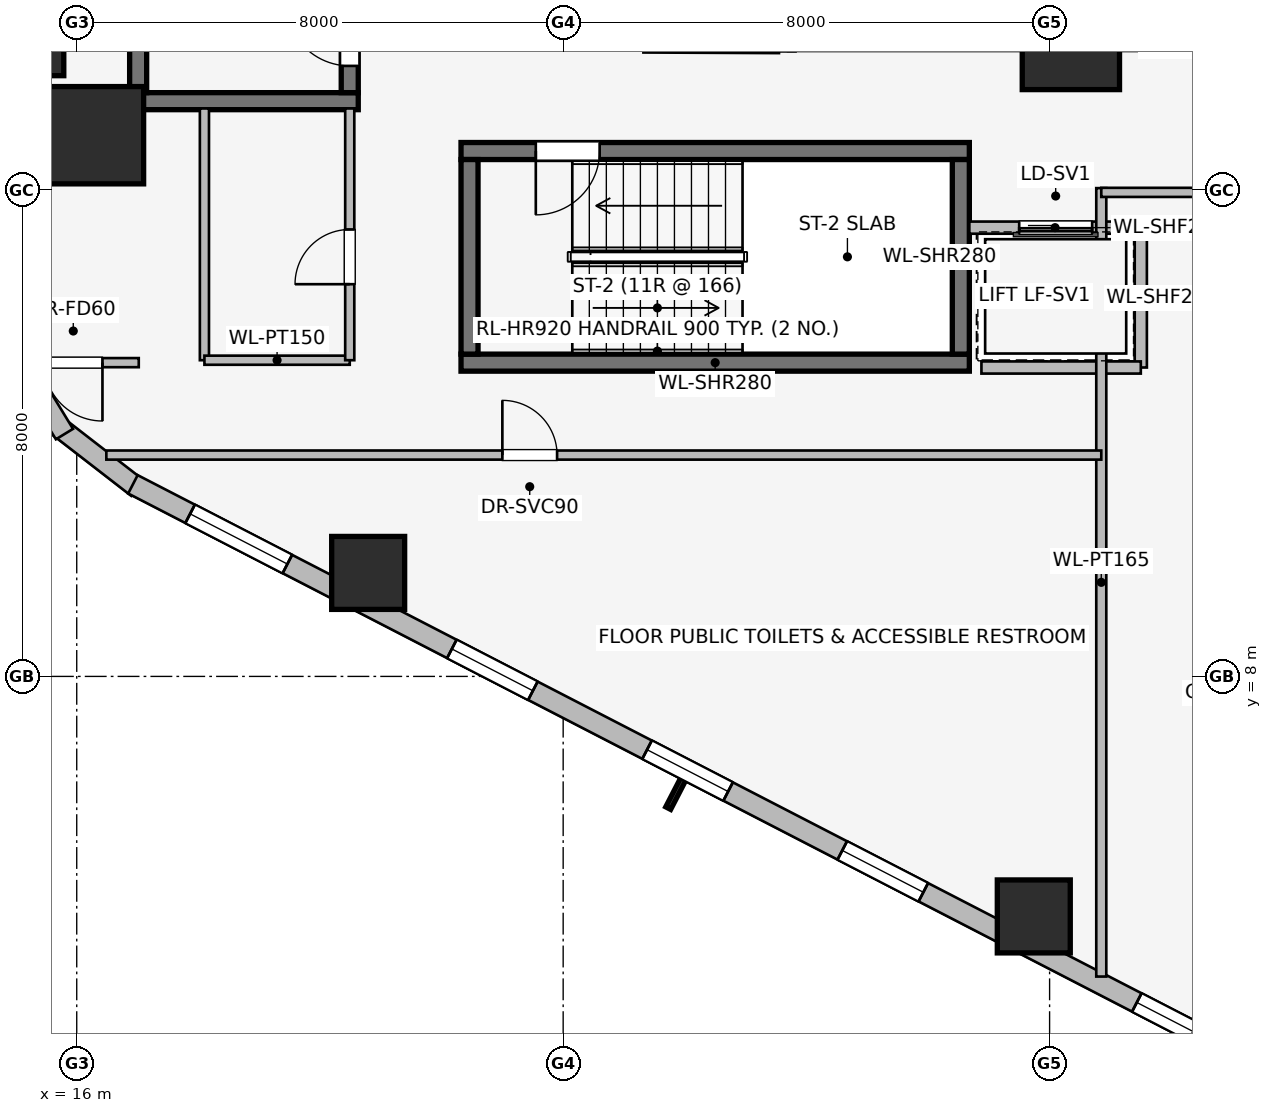
"""IFC4 building model, lengths in metres.
Left out: names, types, materials, properties, quantities, classifications, styles, units other than length and angle.
Written with IfcOpenShell. Run it as: python <this file> out.ifc"""

import sys

from ifc_helpers import new_model, si_unit, direction, frame, frame_2d, origin, origin_2d, place, context, subcontext, project, spatial, rectangle, extrude, element, fill, save


model = new_model("IFC4")
c1 = context("Model", 3, precision=1e-05, world=origin(), true_north=direction((0.0, 1.0)))
c2 = subcontext(c1, "Body", "Model", "MODEL_VIEW")
j1 = project(units=[si_unit("LENGTHUNIT", "METRE"), si_unit("PLANEANGLEUNIT", "RADIAN")], contexts=[c1])
p1 = place(None, origin())
s1 = spatial("IfcSite", under=j1, at=p1, CompositionType="ELEMENT")
p2 = place(p1, origin())
s2 = spatial("IfcBuilding", under=s1, at=p2, CompositionType="ELEMENT")
p3 = place(p2, frame((0.0, 0.0, 92.7)))
s3 = spatial("IfcBuildingStorey", under=s2, at=p3, CompositionType="ELEMENT", Elevation=92.7)
p4 = place(p3, frame((16.87, 17.46, 0.0), z_axis=(0.0, 0.0, 1.0), x_axis=(1.0, 0.0, 0.0)))
e1 = element("IfcWall", 1, at=p4, inside=s3, PredefinedType="SHEAR", context=c2, shape_type="SweptSolid", body=[
    extrude(rectangle(XDim=3.76, YDim=0.28, at=frame_2d((1.88, 0.0))), origin(), (0.0, 0.0, 1.0), 3.65),
])
p5 = place(p3, frame((17.01, 25.4, 0.0), z_axis=(0.0, 0.0, 1.0), x_axis=(0.0, -1.0, 0.0)))
e2 = element("IfcWall", 2, at=p5, inside=s3, PredefinedType="SHEAR", context=c2, shape_type="SweptSolid", body=[
    extrude(rectangle(XDim=7.8, YDim=0.28, at=frame_2d((3.9, 0.0))), origin(), (0.0, 0.0, 1.0), 3.65),
])
p6 = place(p3, frame((20.49, 17.6, 0.0), z_axis=(0.0, 0.0, 1.0), x_axis=(0.0, 1.0, 0.0)))
e3 = element("IfcWall", 3, at=p6, inside=s3, PredefinedType="SHEAR", context=c2, shape_type="SweptSolid", body=[
    extrude(rectangle(XDim=7.8, YDim=0.28, at=frame_2d((3.9, 0.0))), origin(), (0.0, 0.0, 1.0), 3.65),
])
p7 = place(p6, frame((0.44, 0.0, 0.0)))
e4 = element("IfcOpeningElement", 4, at=p7, cuts=e3, PredefinedType="OPENING", context=c2, shape_type="SweptSolid", body=[
    extrude(rectangle(XDim=1.05, YDim=2.0, at=frame_2d((0.525, 1.0))), frame((0.0, 0.15, 0.0), z_axis=(0.0, -1.0, 0.0), x_axis=(1.0, 0.0, 0.0)), (0.0, 0.0, 1.0), 0.3),
])
p8 = place(p3, frame((22.32, 13.16, 0.0), z_axis=(0.0, 0.0, 1.0), x_axis=(1.0, 0.0, 0.0)))
e5 = element("IfcWall", 5, at=p8, inside=s3, PredefinedType="SHEAR", context=c2, shape_type="SweptSolid", body=[
    extrude(rectangle(XDim=8.36, YDim=0.28, at=frame_2d((4.18, 0.0))), origin(), (0.0, 0.0, 1.0), 3.65),
])
p9 = place(p3, frame((30.68, 16.64, 0.0), z_axis=(0.0, 0.0, 1.0), x_axis=(-1.0, 0.0, 0.0)))
e6 = element("IfcWall", 6, at=p9, inside=s3, PredefinedType="SHEAR", context=c2, shape_type="SweptSolid", body=[
    extrude(rectangle(XDim=8.36, YDim=0.28, at=frame_2d((4.18, 0.0))), origin(), (0.0, 0.0, 1.0), 3.65),
])
p10 = place(p9, frame((6.08, 0.0, 0.0)))
e7 = element("IfcOpeningElement", 7, at=p10, cuts=e6, PredefinedType="OPENING", context=c2, shape_type="SweptSolid", body=[
    extrude(rectangle(XDim=1.05, YDim=2.0, at=frame_2d((0.525, 1.0))), frame((0.0, 0.15, 0.0), z_axis=(0.0, -1.0, 0.0), x_axis=(1.0, 0.0, 0.0)), (0.0, 0.0, 1.0), 0.3),
])
for number, where, z_axis, x_axis in (
    (8, (22.46, 16.5, 0.0), (0.0, 0.0, 1.0), (0.0, -1.0, 0.0)),
    (9, (30.54, 13.3, 0.0), (0.0, 0.0, 1.0), (0.0, 1.0, 0.0)),
):
    element("IfcWall", number, at=place(p3, frame(where, z_axis=z_axis, x_axis=x_axis)), inside=s3, PredefinedType="SHEAR", context=c2, shape_type="SweptSolid", body=[
        extrude(rectangle(XDim=3.2, YDim=0.28, at=frame_2d((1.6, 0.0))), origin(), (0.0, 0.0, 1.0), 3.65),
    ])
for number, where, z_axis, x_axis in (
    (10, (16.3, 16.9, 0.0), (0.0, 0.0, 1.0), (1.0, 0.0, 0.0)),
    (11, (32.35, 18.45, 0.0), (0.0, 0.0, 1.0), (1.0, 0.0, 0.0)),
):
    element("IfcColumn", number, at=place(p3, frame(where, z_axis=z_axis, x_axis=x_axis)), inside=s3, PredefinedType="COLUMN", context=c2, shape_type="SweptSolid", body=[
        extrude(rectangle(XDim=1.6, YDim=1.6, at=origin_2d()), origin(), (0.0, 0.0, 1.0), 3.65),
    ])
for number, where, z_axis, x_axis in (
    (12, (15.187, 18.479, 0.0), (0.0, 0.0, 1.0), (1.0, 0.0, 0.0)),
    (13, (20.793, 9.702, 0.0), (0.0, 0.0, 1.0), (1.0, 0.0, 0.0)),
    (14, (31.74, 4.053, 0.0), (0.0, 0.0, 1.0), (1.0, 0.0, 0.0)),
):
    element("IfcColumn", number, at=place(p3, frame(where, z_axis=z_axis, x_axis=x_axis)), inside=s3, PredefinedType="COLUMN", context=c2, shape_type="SweptSolid", body=[
        extrude(rectangle(XDim=1.2, YDim=1.2, at=origin_2d()), origin(), (0.0, 0.0, 1.0), 3.65),
    ])
p11 = place(p3, frame((16.998, 11.099, 0.0), z_axis=(0.0, 0.0, 1.0), x_axis=(-0.790691856293, 0.61221433207, 0.0)))
e15 = element("IfcWall", 15, at=p11, inside=s3, PredefinedType="STANDARD", context=c2, shape_type="SweptSolid", body=[
    extrude(rectangle(XDim=1.676, YDim=0.33, at=frame_2d((0.838, 0.0))), origin(), (0.0, 0.0, 1.0), 3.34),
])
p12 = place(p3, frame((15.798, 11.985, 0.0), z_axis=(0.0, 0.0, 1.0), x_axis=(-0.520584129191, 0.853810379671, 0.0)))
e16 = element("IfcWall", 16, at=p12, inside=s3, PredefinedType="STANDARD", context=c2, shape_type="SweptSolid", body=[
    extrude(rectangle(XDim=1.677, YDim=0.33, at=frame_2d((0.838, 0.0))), origin(), (0.0, 0.0, 1.0), 3.34),
])
p13 = place(p3, frame((35.169, 1.743, 0.0), z_axis=(0.0, 0.0, 1.0), x_axis=(-0.888634413993, 0.458616264721, 0.0)))
e17 = element("IfcWall", 17, at=p13, inside=s3, PredefinedType="STANDARD", context=c2, shape_type="SweptSolid", body=[
    extrude(rectangle(XDim=20.531, YDim=0.34, at=frame_2d((10.266, 0.0))), origin(), (0.0, 0.0, 1.0), 2.634),
])
p14 = place(p13, frame((0.902, 0.0, 0.75)))
e18 = element("IfcOpeningElement", 18, at=p14, cuts=e17, PredefinedType="OPENING", context=c2, shape_type="SweptSolid", body=[
    extrude(rectangle(XDim=1.05, YDim=1.4, at=frame_2d((0.525, 0.7))), frame((0.0, 0.18, 0.0), z_axis=(0.0, -1.0, 0.0), x_axis=(1.0, 0.0, 0.0)), (0.0, 0.0, 1.0), 0.36),
])
p15 = place(p13, frame((5.903, 0.0, 0.75)))
e19 = element("IfcOpeningElement", 19, at=p15, cuts=e17, PredefinedType="OPENING", context=c2, shape_type="SweptSolid", body=[
    extrude(rectangle(XDim=1.5, YDim=1.5, at=frame_2d((0.75, 0.75))), frame((0.0, 0.18, 0.0), z_axis=(0.0, -1.0, 0.0), x_axis=(1.0, 0.0, 0.0)), (0.0, 0.0, 1.0), 0.36),
])
p16 = place(p13, frame((9.516, 0.0, 0.75)))
e20 = element("IfcOpeningElement", 20, at=p16, cuts=e17, PredefinedType="OPENING", context=c2, shape_type="SweptSolid", body=[
    extrude(rectangle(XDim=1.5, YDim=1.5, at=frame_2d((0.75, 0.75))), frame((0.0, 0.18, 0.0), z_axis=(0.0, -1.0, 0.0), x_axis=(1.0, 0.0, 0.0)), (0.0, 0.0, 1.0), 0.36),
])
p17 = place(p13, frame((13.129, 0.0, 0.75)))
e21 = element("IfcOpeningElement", 21, at=p17, cuts=e17, PredefinedType="OPENING", context=c2, shape_type="SweptSolid", body=[
    extrude(rectangle(XDim=1.5, YDim=1.5, at=frame_2d((0.75, 0.75))), frame((0.0, 0.18, 0.0), z_axis=(0.0, -1.0, 0.0), x_axis=(1.0, 0.0, 0.0)), (0.0, 0.0, 1.0), 0.36),
])
p18 = place(p13, frame((17.673, 0.0, 0.75)))
e22 = element("IfcOpeningElement", 22, at=p18, cuts=e17, PredefinedType="OPENING", context=c2, shape_type="SweptSolid", body=[
    extrude(rectangle(XDim=1.8, YDim=1.5, at=frame_2d((0.9, 0.75))), frame((0.0, 0.18, 0.0), z_axis=(0.0, -1.0, 0.0), x_axis=(1.0, 0.0, 0.0)), (0.0, 0.0, 1.0), 0.36),
])
p19 = place(p3, frame((33.5, 15.38, 0.0), z_axis=(0.0, 0.0, 1.0), x_axis=(-1.0, 0.0, 0.0)))
e23 = element("IfcWall", 23, at=p19, inside=s3, PredefinedType="PARTITIONING", context=c2, shape_type="SweptSolid", body=[
    extrude(rectangle(XDim=2.82, YDim=0.2, at=frame_2d((1.41, 0.0))), origin(), (0.0, 0.0, 1.0), 3.34),
])
p20 = place(p19, frame((0.8, 0.0, 0.0)))
e24 = element("IfcOpeningElement", 24, at=p20, cuts=e23, PredefinedType="OPENING", context=c2, shape_type="SweptSolid", body=[
    extrude(rectangle(XDim=1.2, YDim=2.2, at=frame_2d((0.6, 1.1))), frame((0.0, 0.11, 0.0), z_axis=(0.0, -1.0, 0.0), x_axis=(1.0, 0.0, 0.0)), (0.0, 0.0, 1.0), 0.22),
])
p21 = place(p3, frame((33.5, 13.08, 0.0), z_axis=(0.0, 0.0, 1.0), x_axis=(0.0, 1.0, 0.0)))
e25 = element("IfcWall", 25, at=p21, inside=s3, PredefinedType="PARTITIONING", context=c2, shape_type="SweptSolid", body=[
    extrude(rectangle(XDim=2.3, YDim=0.2, at=frame_2d((1.15, 0.0))), origin(), (0.0, 0.0, 1.0), 3.34),
])
p22 = place(p3, frame((30.879, 13.08, 0.0), z_axis=(0.0, 0.0, 1.0), x_axis=(1.0, 0.0, 0.0)))
e26 = element("IfcWall", 26, at=p22, inside=s3, PredefinedType="PARTITIONING", context=c2, shape_type="SweptSolid", body=[
    extrude(rectangle(XDim=2.621, YDim=0.2, at=frame_2d((1.311, 0.0))), origin(), (0.0, 0.0, 1.0), 3.34),
])
p23 = place(p3, frame((25.32, 18.36, 0.0), z_axis=(0.0, 0.0, 1.0), x_axis=(0.999989925833, -0.004488678231, 0.0)))
e27 = element("IfcWall", 27, at=p23, inside=s3, PredefinedType="PARTITIONING", context=c2, shape_type="SweptSolid", body=[
    extrude(rectangle(XDim=2.23, YDim=0.2, at=frame_2d((1.115, 0.0))), origin(), (0.0, 0.0, 1.0), 3.34),
])
p24 = place(p3, frame((18.1, 17.34, 0.0), z_axis=(0.0, 0.0, 1.0), x_axis=(0.0, -1.0, 0.0)))
e28 = element("IfcWall", 28, at=p24, inside=s3, PredefinedType="PARTITIONING", context=c2, shape_type="SweptSolid", body=[
    extrude(rectangle(XDim=4.14, YDim=0.15, at=frame_2d((2.07, 0.0))), origin(), (0.0, 0.0, 1.0), 3.34),
])
p25 = place(p3, frame((18.1, 13.2, 0.0), z_axis=(0.0, 0.0, 1.0), x_axis=(1.0, 0.0, 0.0)))
e29 = element("IfcWall", 29, at=p25, inside=s3, PredefinedType="PARTITIONING", context=c2, shape_type="SweptSolid", body=[
    extrude(rectangle(XDim=2.39, YDim=0.15, at=frame_2d((1.195, 0.0))), origin(), (0.0, 0.0, 1.0), 3.34),
])
p26 = place(p3, frame((20.49, 13.2, 0.0), z_axis=(0.0, 0.0, 1.0), x_axis=(0.0, 1.0, 0.0)))
e30 = element("IfcWall", 30, at=p26, inside=s3, PredefinedType="PARTITIONING", context=c2, shape_type="SweptSolid", body=[
    extrude(rectangle(XDim=4.14, YDim=0.15, at=frame_2d((2.07, 0.0))), origin(), (0.0, 0.0, 1.0), 3.34),
])
p27 = place(p26, frame((1.25, 0.0, 0.0)))
e31 = element("IfcOpeningElement", 31, at=p27, cuts=e30, PredefinedType="OPENING", context=c2, shape_type="SweptSolid", body=[
    extrude(rectangle(XDim=0.9, YDim=2.0, at=frame_2d((0.45, 1.0))), frame((0.0, 0.085, 0.0), z_axis=(0.0, -1.0, 0.0), x_axis=(1.0, 0.0, 0.0)), (0.0, 0.0, 1.0), 0.17),
])
p28 = place(p3, frame((32.85, 3.064, 0.0), z_axis=(0.0, 0.0, 1.0), x_axis=(0.0, 1.0, 0.0)))
e32 = element("IfcWall", 32, at=p28, inside=s3, PredefinedType="PARTITIONING", context=c2, shape_type="SweptSolid", body=[
    extrude(rectangle(XDim=12.966, YDim=0.165, at=frame_2d((6.483, 0.0))), origin(), (0.0, 0.0, 1.0), 3.34),
])
p29 = place(p3, frame((16.487, 11.64, 0.0), z_axis=(0.0, 0.0, 1.0), x_axis=(1.0, 0.0, 0.0)))
e33 = element("IfcWall", 33, at=p29, inside=s3, PredefinedType="PARTITIONING", context=c2, shape_type="SweptSolid", body=[
    extrude(rectangle(XDim=16.363, YDim=0.15, at=frame_2d((8.182, 0.0))), origin(), (0.0, 0.0, 1.0), 3.34),
])
p30 = place(p29, frame((6.513, 0.0, 0.0)))
e34 = element("IfcOpeningElement", 34, at=p30, cuts=e33, PredefinedType="OPENING", context=c2, shape_type="SweptSolid", body=[
    extrude(rectangle(XDim=0.9, YDim=2.0, at=frame_2d((0.45, 1.0))), frame((0.0, 0.085, 0.0), z_axis=(0.0, -1.0, 0.0), x_axis=(1.0, 0.0, 0.0)), (0.0, 0.0, 1.0), 0.17),
])
p31 = place(p3, frame((17.02, 13.16, 0.0), z_axis=(0.0, 0.0, 1.0), x_axis=(-1.0, 0.0, 0.0)))
e35 = element("IfcWall", 35, at=p31, inside=s3, PredefinedType="PARTITIONING", context=c2, shape_type="SweptSolid", body=[
    extrude(rectangle(XDim=2.12, YDim=0.15, at=frame_2d((1.06, 0.0))), origin(), (0.0, 0.0, 1.0), 3.34),
])
p32 = place(p31, frame((0.597, 0.0, 0.0)))
e36 = element("IfcOpeningElement", 36, at=p32, cuts=e35, PredefinedType="OPENING", context=c2, shape_type="SweptSolid", body=[
    extrude(rectangle(XDim=0.96, YDim=2.0, at=frame_2d((0.48, 1.0))), frame((0.0, 0.085, 0.0), z_axis=(0.0, -1.0, 0.0), x_axis=(1.0, 0.0, 0.0)), (0.0, 0.0, 1.0), 0.17),
])
p33 = place(p3, frame((32.85, 15.96, 0.0), z_axis=(0.0, 0.0, 1.0), x_axis=(1.0, 0.0, 0.0)))
e37 = element("IfcWall", 37, at=p33, inside=s3, PredefinedType="PARTITIONING", context=c2, shape_type="SweptSolid", body=[
    extrude(rectangle(XDim=6.001, YDim=0.15, at=frame_2d((3.0, 0.0))), origin(), (0.0, 0.0, 1.0), 3.34),
])
p34 = place(p33, frame((2.521, 0.0, 0.0)))
e38 = element("IfcOpeningElement", 38, at=p34, cuts=e37, PredefinedType="OPENING", context=c2, shape_type="SweptSolid", body=[
    extrude(rectangle(XDim=0.96, YDim=2.0, at=frame_2d((0.48, 1.0))), frame((0.0, 0.085, 0.0), z_axis=(0.0, -1.0, 0.0), x_axis=(1.0, 0.0, 0.0)), (0.0, 0.0, 1.0), 0.17),
])
p35 = place(p14, origin())
e39 = element("IfcWindow", 39, at=p35, inside=s3, PartitioningType="SINGLE_PANEL", PredefinedType="WINDOW", context=c2, shape_type="SweptSolid", body=[
    extrude(rectangle(XDim=1.05, YDim=1.4, at=frame_2d((0.525, 0.7))), frame((0.0, 0.03, 0.0), z_axis=(0.0, -1.0, 0.0), x_axis=(1.0, 0.0, 0.0)), (0.0, 0.0, 1.0), 0.06),
])
fill(e18, e39)
p36 = place(p15, origin())
e40 = element("IfcWindow", 40, at=p36, inside=s3, PartitioningType="SINGLE_PANEL", PredefinedType="WINDOW", context=c2, shape_type="SweptSolid", body=[
    extrude(rectangle(XDim=1.5, YDim=1.5, at=frame_2d((0.75, 0.75))), frame((0.0, 0.03, 0.0), z_axis=(0.0, -1.0, 0.0), x_axis=(1.0, 0.0, 0.0)), (0.0, 0.0, 1.0), 0.06),
])
fill(e19, e40)
p37 = place(p16, origin())
e41 = element("IfcWindow", 41, at=p37, inside=s3, PartitioningType="SINGLE_PANEL", PredefinedType="WINDOW", context=c2, shape_type="SweptSolid", body=[
    extrude(rectangle(XDim=1.5, YDim=1.5, at=frame_2d((0.75, 0.75))), frame((0.0, 0.03, 0.0), z_axis=(0.0, -1.0, 0.0), x_axis=(1.0, 0.0, 0.0)), (0.0, 0.0, 1.0), 0.06),
])
fill(e20, e41)
p38 = place(p17, origin())
e42 = element("IfcWindow", 42, at=p38, inside=s3, PartitioningType="SINGLE_PANEL", PredefinedType="WINDOW", context=c2, shape_type="SweptSolid", body=[
    extrude(rectangle(XDim=1.5, YDim=1.5, at=frame_2d((0.75, 0.75))), frame((0.0, 0.03, 0.0), z_axis=(0.0, -1.0, 0.0), x_axis=(1.0, 0.0, 0.0)), (0.0, 0.0, 1.0), 0.06),
])
fill(e21, e42)
p39 = place(p18, origin())
e43 = element("IfcWindow", 43, at=p39, inside=s3, PartitioningType="SINGLE_PANEL", PredefinedType="WINDOW", context=c2, shape_type="SweptSolid", body=[
    extrude(rectangle(XDim=1.8, YDim=1.5, at=frame_2d((0.9, 0.75))), frame((0.0, 0.03, 0.0), z_axis=(0.0, -1.0, 0.0), x_axis=(1.0, 0.0, 0.0)), (0.0, 0.0, 1.0), 0.06),
])
fill(e22, e43)
p40 = place(p7, origin())
e44 = element("IfcDoor", 44, at=p40, inside=s3, OperationType="SINGLE_SWING_RIGHT", PredefinedType="DOOR", context=c2, shape_type="SweptSolid", body=[
    extrude(rectangle(XDim=1.05, YDim=2.0, at=frame_2d((0.525, 1.0))), frame((0.0, 0.025, 0.0), z_axis=(0.0, -1.0, 0.0), x_axis=(1.0, 0.0, 0.0)), (0.0, 0.0, 1.0), 0.05),
])
fill(e4, e44)
p41 = place(p10, origin())
e45 = element("IfcDoor", 45, at=p41, inside=s3, OperationType="SINGLE_SWING_RIGHT", PredefinedType="DOOR", context=c2, shape_type="SweptSolid", body=[
    extrude(rectangle(XDim=1.05, YDim=2.0, at=frame_2d((0.525, 1.0))), frame((0.0, 0.025, 0.0), z_axis=(0.0, -1.0, 0.0), x_axis=(1.0, 0.0, 0.0)), (0.0, 0.0, 1.0), 0.05),
])
fill(e7, e45)
p42 = place(p20, origin())
e46 = element("IfcDoor", 46, at=p42, inside=s3, OperationType="SLIDING_TO_RIGHT", PredefinedType="DOOR", context=c2, shape_type="SweptSolid", body=[
    extrude(rectangle(XDim=1.2, YDim=2.2, at=frame_2d((0.6, 1.1))), frame((0.0, 0.025, 0.0), z_axis=(0.0, -1.0, 0.0), x_axis=(1.0, 0.0, 0.0)), (0.0, 0.0, 1.0), 0.05),
])
fill(e24, e46)
p43 = place(p27, origin())
e47 = element("IfcDoor", 47, at=p43, inside=s3, OperationType="SINGLE_SWING_LEFT", PredefinedType="DOOR", context=c2, shape_type="SweptSolid", body=[
    extrude(rectangle(XDim=0.9, YDim=2.0, at=frame_2d((0.45, 1.0))), frame((0.0, 0.025, 0.0), z_axis=(0.0, -1.0, 0.0), x_axis=(1.0, 0.0, 0.0)), (0.0, 0.0, 1.0), 0.05),
])
fill(e31, e47)
p44 = place(p30, origin())
e48 = element("IfcDoor", 48, at=p44, inside=s3, OperationType="SINGLE_SWING_LEFT", PredefinedType="DOOR", context=c2, shape_type="SweptSolid", body=[
    extrude(rectangle(XDim=0.9, YDim=2.0, at=frame_2d((0.45, 1.0))), frame((0.0, 0.025, 0.0), z_axis=(0.0, -1.0, 0.0), x_axis=(1.0, 0.0, 0.0)), (0.0, 0.0, 1.0), 0.05),
])
fill(e34, e48)
p45 = place(p32, origin())
e49 = element("IfcDoor", 49, at=p45, inside=s3, OperationType="SINGLE_SWING_LEFT", PredefinedType="DOOR", context=c2, shape_type="SweptSolid", body=[
    extrude(rectangle(XDim=0.96, YDim=2.0, at=frame_2d((0.48, 1.0))), frame((0.0, 0.025, 0.0), z_axis=(0.0, -1.0, 0.0), x_axis=(1.0, 0.0, 0.0)), (0.0, 0.0, 1.0), 0.05),
])
fill(e36, e49)
save(model, sys.argv[1])
